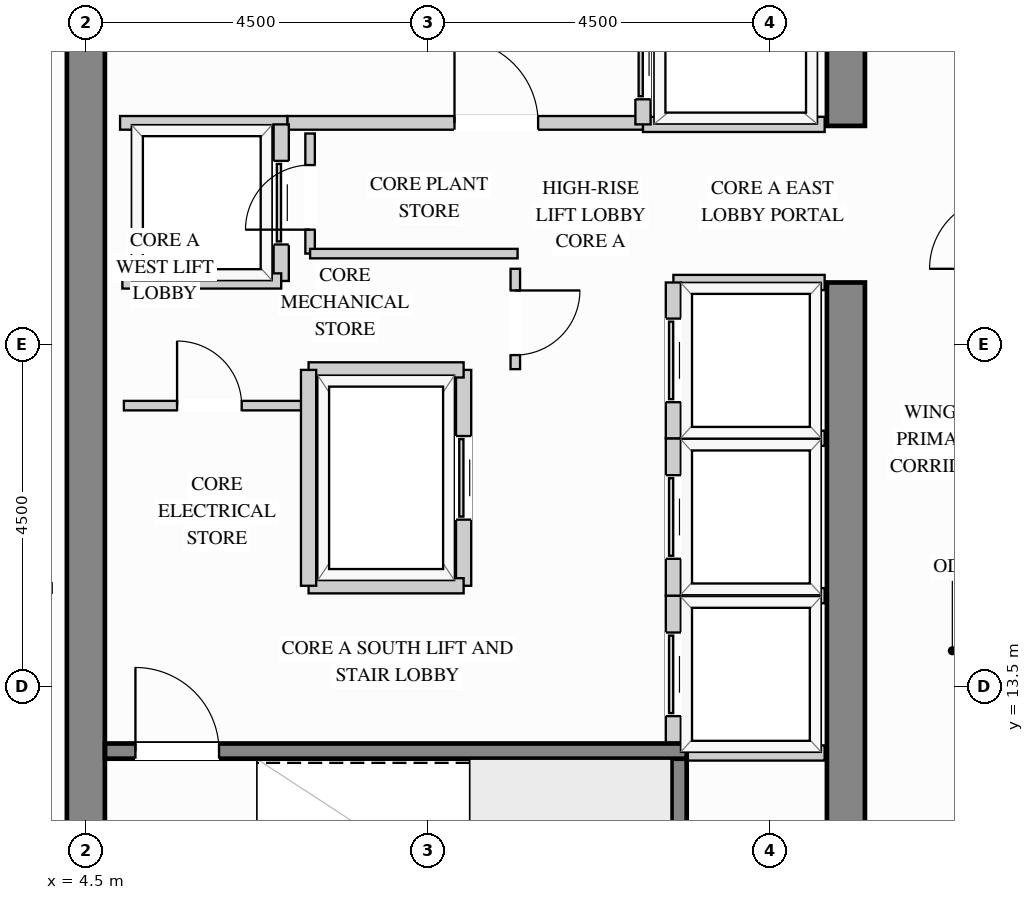
"""IFC4 building model, lengths in metres.
Left out: names, types, materials, properties, quantities, classifications, styles, units other than length and angle.
Written with IfcOpenShell. Run it as: python <this file> out.ifc"""

import sys

from ifc_helpers import new_model, si_unit, direction, frame, frame_2d, origin, place, context, subcontext, project, spatial, rectangle, extrude, source, transform, mapped, element, fill, save


model = new_model("IFC4")
c1 = context("Model", 3, precision=1e-05, world=origin(), true_north=direction((0.0, 1.0)))
c2 = subcontext(c1, "Body", "Model", "MODEL_VIEW")
j1 = project(units=[si_unit("LENGTHUNIT", "METRE"), si_unit("PLANEANGLEUNIT", "RADIAN")], contexts=[c1])
p1 = place(None, origin())
s1 = spatial("IfcSite", under=j1, at=p1, CompositionType="ELEMENT")
p2 = place(p1, origin())
s2 = spatial("IfcBuilding", under=s1, at=p2, CompositionType="ELEMENT")
p3 = place(p2, frame((0.0, 0.0, 219.6)))
s3 = spatial("IfcBuildingStorey", under=s2, at=p3, CompositionType="ELEMENT", Elevation=219.6)
m1 = source(origin(), c2, "Body", "SweptSolid", [
    extrude(rectangle(XDim=10.07, YDim=0.5, at=frame_2d((5.035, 0.0))), origin(), (0.0, 0.0, 1.0), 3.4),
])
p4 = place(p3, frame((14.5, 8.75, 0.0), z_axis=(0.0, 0.0, 1.0), x_axis=(0.0, 1.0, 0.0)))
e1 = element("IfcWall", 1, at=p4, inside=s3, PredefinedType="SHEAR", context=c2, shape_type="MappedRepresentation", body=[
    mapped(m1, transform((0.0, 0.0, 0.0), x_axis=(1.0, 0.0, 0.0), y_axis=(0.0, 1.0, 0.0), z_axis=(0.0, 0.0, 1.0))),
])
m2 = source(origin(), c2, "Body", "SweptSolid", [
    extrude(rectangle(XDim=8.37, YDim=0.5, at=frame_2d((4.185, 0.0))), origin(), (0.0, 0.0, 1.0), 3.4),
])
p5 = place(p3, frame((14.5, 20.88, 0.0), z_axis=(0.0, 0.0, 1.0), x_axis=(0.0, 1.0, 0.0)))
e2 = element("IfcWall", 2, at=p5, inside=s3, PredefinedType="SHEAR", context=c2, shape_type="MappedRepresentation", body=[
    mapped(m2, transform((0.0, 0.0, 0.0), x_axis=(1.0, 0.0, 0.0), y_axis=(0.0, 1.0, 0.0), z_axis=(0.0, 0.0, 1.0))),
])
m3 = source(origin(), c2, "Body", "SweptSolid", [
    extrude(rectangle(XDim=20.5, YDim=0.5, at=frame_2d((10.25, 0.0))), origin(), (0.0, 0.0, 1.0), 3.4),
])
p6 = place(p3, frame((4.5, 8.75, 0.0), z_axis=(0.0, 0.0, 1.0), x_axis=(0.0, 1.0, 0.0)))
e3 = element("IfcWall", 3, at=p6, inside=s3, PredefinedType="SHEAR", context=c2, shape_type="MappedRepresentation", body=[
    mapped(m3, transform((0.0, 0.0, 0.0), x_axis=(1.0, 0.0, 0.0), y_axis=(0.0, 1.0, 0.0), z_axis=(0.0, 0.0, 1.0))),
])
p7 = place(p3, frame((7.15, 20.92, 0.0), z_axis=(0.0, 0.0, 1.0), x_axis=(1.0, 0.0, 0.0)))
e4 = element("IfcWall", 4, at=p7, inside=s3, PredefinedType="PARTITIONING", context=c2, shape_type="SweptSolid", body=[
    extrude(rectangle(XDim=4.68, YDim=0.18, at=frame_2d((2.34, 0.0))), origin(), (0.0, 0.0, 1.0), 3.385),
])
p8 = place(p7, frame((2.2, 0.0, 0.0)))
e5 = element("IfcOpeningElement", 5, at=p8, cuts=e4, PredefinedType="OPENING", context=c2, shape_type="SweptSolid", body=[
    extrude(rectangle(XDim=1.1, YDim=2.15, at=frame_2d((0.55, 1.075))), frame((0.0, 0.1, 0.0), z_axis=(0.0, -1.0, 0.0), x_axis=(1.0, 0.0, 0.0)), (0.0, 0.0, 1.0), 0.2),
])
m4 = source(origin(), c2, "Body", "SweptSolid", [
    extrude(rectangle(XDim=2.2, YDim=0.18, at=frame_2d((1.1, 0.0))), origin(), (0.0, 0.0, 1.0), 3.385),
])
p9 = place(p3, frame((4.95, 20.92, 0.0), z_axis=(0.0, 0.0, 1.0), x_axis=(1.0, 0.0, 0.0)))
e6 = element("IfcWall", 6, at=p9, inside=s3, PredefinedType="PARTITIONING", context=c2, shape_type="MappedRepresentation", body=[
    mapped(m4, transform((0.0, 0.0, 0.0), x_axis=(1.0, 0.0, 0.0), y_axis=(0.0, 1.0, 0.0), z_axis=(0.0, 0.0, 1.0))),
])
p10 = place(p3, frame((10.15, 17.68, 0.0), z_axis=(0.0, 0.0, 1.0), x_axis=(0.0, 1.0, 0.0)))
e7 = element("IfcWall", 7, at=p10, inside=s3, PredefinedType="PARTITIONING", context=c2, shape_type="SweptSolid", body=[
    extrude(rectangle(XDim=1.32, YDim=0.125, at=frame_2d((0.66, 0.0))), origin(), (0.0, 0.0, 1.0), 3.385),
])
p11 = place(p10, frame((0.185, 0.0, 0.0)))
e8 = element("IfcOpeningElement", 8, at=p11, cuts=e7, PredefinedType="OPENING", context=c2, shape_type="SweptSolid", body=[
    extrude(rectangle(XDim=0.85, YDim=2.1, at=frame_2d((0.425, 1.05))), frame((0.0, 0.073, 0.0), z_axis=(0.0, -1.0, 0.0), x_axis=(1.0, 0.0, 0.0)), (0.0, 0.0, 1.0), 0.145),
])
p12 = place(p3, frame((7.45, 19.2, 0.0), z_axis=(0.0, 0.0, 1.0), x_axis=(0.0, 1.0, 0.0)))
e9 = element("IfcWall", 9, at=p12, inside=s3, PredefinedType="PARTITIONING", context=c2, shape_type="SweptSolid", body=[
    extrude(rectangle(XDim=1.58, YDim=0.125, at=frame_2d((0.79, 0.0))), origin(), (0.0, 0.0, 1.0), 3.385),
])
p13 = place(p12, frame((0.315, 0.0, 0.0)))
e10 = element("IfcOpeningElement", 10, at=p13, cuts=e9, PredefinedType="OPENING", context=c2, shape_type="SweptSolid", body=[
    extrude(rectangle(XDim=0.85, YDim=2.1, at=frame_2d((0.425, 1.05))), frame((0.0, 0.073, 0.0), z_axis=(0.0, -1.0, 0.0), x_axis=(1.0, 0.0, 0.0)), (0.0, 0.0, 1.0), 0.145),
])
m5 = source(origin(), c2, "Body", "SweptSolid", [
    extrude(rectangle(XDim=2.73, YDim=0.125, at=frame_2d((1.365, 0.0))), origin(), (0.0, 0.0, 1.0), 3.385),
])
p14 = place(p3, frame((7.45, 19.2, 0.0), z_axis=(0.0, 0.0, 1.0), x_axis=(1.0, 0.0, 0.0)))
e11 = element("IfcWall", 11, at=p14, inside=s3, PredefinedType="PARTITIONING", context=c2, shape_type="MappedRepresentation", body=[
    mapped(m5, transform((0.0, 0.0, 0.0), x_axis=(1.0, 0.0, 0.0), y_axis=(0.0, 1.0, 0.0), z_axis=(0.0, 0.0, 1.0))),
])
p15 = place(p3, frame((5.0, 17.2, 0.0), z_axis=(0.0, 0.0, 1.0), x_axis=(1.0, 0.0, 0.0)))
e12 = element("IfcWall", 12, at=p15, inside=s3, PredefinedType="PARTITIONING", context=c2, shape_type="SweptSolid", body=[
    extrude(rectangle(XDim=2.4, YDim=0.125, at=frame_2d((1.2, 0.0))), origin(), (0.0, 0.0, 1.0), 3.385),
])
p16 = place(p15, frame((0.7, 0.0, 0.0)))
e13 = element("IfcOpeningElement", 13, at=p16, cuts=e12, PredefinedType="OPENING", context=c2, shape_type="SweptSolid", body=[
    extrude(rectangle(XDim=0.85, YDim=2.1, at=frame_2d((0.425, 1.05))), frame((0.0, 0.073, 0.0), z_axis=(0.0, -1.0, 0.0), x_axis=(1.0, 0.0, 0.0)), (0.0, 0.0, 1.0), 0.145),
])
m6 = source(origin(), c2, "Body", "SweptSolid", [
    extrude(rectangle(XDim=3.698, YDim=0.125, at=frame_2d((1.849, 0.0))), origin(), (0.0, 0.0, 1.0), 3.385),
])
p17 = place(p3, frame((0.352, 14.8, 0.0), z_axis=(0.0, 0.0, 1.0), x_axis=(1.0, 0.0, 0.0)))
e14 = element("IfcWall", 14, at=p17, inside=s3, PredefinedType="PARTITIONING", context=c2, shape_type="MappedRepresentation", body=[
    mapped(m6, transform((0.0, 0.0, 0.0), x_axis=(1.0, 0.0, 0.0), y_axis=(0.0, 1.0, 0.0), z_axis=(0.0, 0.0, 1.0))),
])
m7 = source(origin(), c2, "Body", "SweptSolid", [
    extrude(rectangle(XDim=2.39, YDim=0.2, at=frame_2d((1.195, 0.0))), origin(), (0.0, 0.0, 1.0), 3.385),
])
p18 = place(p3, frame((11.83, 20.9, 0.0), z_axis=(0.0, 0.0, 1.0), x_axis=(1.0, 0.0, 0.0)))
e15 = element("IfcWall", 15, at=p18, inside=s3, PredefinedType="PARTITIONING", context=c2, shape_type="MappedRepresentation", body=[
    mapped(m7, transform((0.0, 0.0, 0.0), x_axis=(1.0, 0.0, 0.0), y_axis=(0.0, 1.0, 0.0), z_axis=(0.0, 0.0, 1.0))),
])
p19 = place(p3, frame((11.83, 20.9, 0.0), z_axis=(0.0, 0.0, 1.0), x_axis=(0.0, 1.0, 0.0)))
e16 = element("IfcWall", 16, at=p19, inside=s3, PredefinedType="PARTITIONING", context=c2, shape_type="SweptSolid", body=[
    extrude(rectangle(XDim=1.76, YDim=0.2, at=frame_2d((0.88, 0.0))), origin(), (0.0, 0.0, 1.0), 3.385),
])
p20 = place(p19, frame((0.33, 0.0, 0.0)))
e17 = element("IfcOpeningElement", 17, at=p20, cuts=e16, PredefinedType="OPENING", context=c2, shape_type="SweptSolid", body=[
    extrude(rectangle(XDim=1.1, YDim=2.2, at=frame_2d((0.55, 1.1))), frame((0.0, 0.11, 0.0), z_axis=(0.0, -1.0, 0.0), x_axis=(1.0, 0.0, 0.0)), (0.0, 0.0, 1.0), 0.22),
])
m8 = source(origin(), c2, "Body", "SweptSolid", [
    extrude(rectangle(XDim=1.99, YDim=0.2, at=frame_2d((0.995, 0.0))), origin(), (0.0, 0.0, 1.0), 3.385),
])
for number, where, z_axis, x_axis in (
    (18, (12.23, 14.7, 0.0), (0.0, 0.0, 1.0), (1.0, 0.0, 0.0)),
    (19, (12.23, 12.63, 0.0), (0.0, 0.0, 1.0), (1.0, 0.0, 0.0)),
):
    element("IfcWall", number, at=place(p3, frame(where, z_axis=z_axis, x_axis=x_axis)), inside=s3, PredefinedType="PARTITIONING", context=c2, shape_type="MappedRepresentation", body=[
        mapped(m8, transform((0.0, 0.0, 0.0), x_axis=(1.0, 0.0, 0.0), y_axis=(0.0, 1.0, 0.0), z_axis=(0.0, 0.0, 1.0))),
    ])
p21 = place(p3, frame((12.23, 12.63, 0.0), z_axis=(0.0, 0.0, 1.0), x_axis=(0.0, 1.0, 0.0)))
e20 = element("IfcWall", 20, at=p21, inside=s3, PredefinedType="PARTITIONING", context=c2, shape_type="SweptSolid", body=[
    extrude(rectangle(XDim=2.07, YDim=0.2, at=frame_2d((1.035, 0.0))), origin(), (0.0, 0.0, 1.0), 3.385),
])
p22 = place(p21, frame((0.485, 0.0, 0.0)))
e21 = element("IfcOpeningElement", 21, at=p22, cuts=e20, PredefinedType="OPENING", context=c2, shape_type="SweptSolid", body=[
    extrude(rectangle(XDim=1.1, YDim=2.2, at=frame_2d((0.55, 1.1))), frame((0.0, 0.11, 0.0), z_axis=(0.0, -1.0, 0.0), x_axis=(1.0, 0.0, 0.0)), (0.0, 0.0, 1.0), 0.22),
])
p23 = place(p3, frame((12.23, 16.77, 0.0), z_axis=(0.0, 0.0, 1.0), x_axis=(1.0, 0.0, 0.0)))
e22 = element("IfcWall", 22, at=p23, inside=s3, PredefinedType="PARTITIONING", context=c2, shape_type="MappedRepresentation", body=[
    mapped(m8, transform((0.0, 0.0, 0.0), x_axis=(1.0, 0.0, 0.0), y_axis=(0.0, 1.0, 0.0), z_axis=(0.0, 0.0, 1.0))),
])
p24 = place(p3, frame((12.23, 14.7, 0.0), z_axis=(0.0, 0.0, 1.0), x_axis=(0.0, 1.0, 0.0)))
e23 = element("IfcWall", 23, at=p24, inside=s3, PredefinedType="PARTITIONING", context=c2, shape_type="SweptSolid", body=[
    extrude(rectangle(XDim=2.07, YDim=0.2, at=frame_2d((1.035, 0.0))), origin(), (0.0, 0.0, 1.0), 3.385),
])
p25 = place(p24, frame((0.485, 0.0, 0.0)))
e24 = element("IfcOpeningElement", 24, at=p25, cuts=e23, PredefinedType="OPENING", context=c2, shape_type="SweptSolid", body=[
    extrude(rectangle(XDim=1.1, YDim=2.2, at=frame_2d((0.55, 1.1))), frame((0.0, 0.11, 0.0), z_axis=(0.0, -1.0, 0.0), x_axis=(1.0, 0.0, 0.0)), (0.0, 0.0, 1.0), 0.22),
])
p26 = place(p3, frame((12.23, 18.82, 0.0), z_axis=(0.0, 0.0, 1.0), x_axis=(1.0, 0.0, 0.0)))
e25 = element("IfcWall", 25, at=p26, inside=s3, PredefinedType="PARTITIONING", context=c2, shape_type="MappedRepresentation", body=[
    mapped(m8, transform((0.0, 0.0, 0.0), x_axis=(1.0, 0.0, 0.0), y_axis=(0.0, 1.0, 0.0), z_axis=(0.0, 0.0, 1.0))),
])
p27 = place(p3, frame((12.23, 16.77, 0.0), z_axis=(0.0, 0.0, 1.0), x_axis=(0.0, 1.0, 0.0)))
e26 = element("IfcWall", 26, at=p27, inside=s3, PredefinedType="PARTITIONING", context=c2, shape_type="SweptSolid", body=[
    extrude(rectangle(XDim=2.05, YDim=0.2, at=frame_2d((1.025, 0.0))), origin(), (0.0, 0.0, 1.0), 3.385),
])
p28 = place(p27, frame((0.475, 0.0, 0.0)))
e27 = element("IfcOpeningElement", 27, at=p28, cuts=e26, PredefinedType="OPENING", context=c2, shape_type="SweptSolid", body=[
    extrude(rectangle(XDim=1.1, YDim=2.2, at=frame_2d((0.55, 1.1))), frame((0.0, 0.11, 0.0), z_axis=(0.0, -1.0, 0.0), x_axis=(1.0, 0.0, 0.0)), (0.0, 0.0, 1.0), 0.22),
])
p29 = place(p3, frame((7.07, 18.84, 0.0), z_axis=(0.0, 0.0, 1.0), x_axis=(0.0, 1.0, 0.0)))
e28 = element("IfcWall", 28, at=p29, inside=s3, PredefinedType="PARTITIONING", context=c2, shape_type="SweptSolid", body=[
    extrude(rectangle(XDim=2.06, YDim=0.2, at=frame_2d((1.03, 0.0))), origin(), (0.0, 0.0, 1.0), 3.385),
])
p30 = place(p29, frame((0.48, 0.0, 0.0)))
e29 = element("IfcOpeningElement", 29, at=p30, cuts=e28, PredefinedType="OPENING", context=c2, shape_type="SweptSolid", body=[
    extrude(rectangle(XDim=1.1, YDim=2.2, at=frame_2d((0.55, 1.1))), frame((0.0, 0.11, 0.0), z_axis=(0.0, -1.0, 0.0), x_axis=(1.0, 0.0, 0.0)), (0.0, 0.0, 1.0), 0.22),
])
m9 = source(origin(), c2, "Body", "SweptSolid", [
    extrude(rectangle(XDim=2.09, YDim=0.2, at=frame_2d((1.045, 0.0))), origin(), (0.0, 0.0, 1.0), 3.385),
])
p31 = place(p3, frame((4.98, 18.84, 0.0), z_axis=(0.0, 0.0, 1.0), x_axis=(1.0, 0.0, 0.0)))
e30 = element("IfcWall", 30, at=p31, inside=s3, PredefinedType="PARTITIONING", context=c2, shape_type="MappedRepresentation", body=[
    mapped(m9, transform((0.0, 0.0, 0.0), x_axis=(1.0, 0.0, 0.0), y_axis=(0.0, 1.0, 0.0), z_axis=(0.0, 0.0, 1.0))),
])
p32 = place(p3, frame((9.47, 14.83, 0.0), z_axis=(0.0, 0.0, 1.0), x_axis=(0.0, 1.0, 0.0)))
e31 = element("IfcWall", 31, at=p32, inside=s3, PredefinedType="PARTITIONING", context=c2, shape_type="SweptSolid", body=[
    extrude(rectangle(XDim=2.84, YDim=0.2, at=frame_2d((1.42, 0.0))), origin(), (0.0, 0.0, 1.0), 3.385),
])
p33 = place(p32, frame((0.87, 0.0, 0.0)))
e32 = element("IfcOpeningElement", 32, at=p33, cuts=e31, PredefinedType="OPENING", context=c2, shape_type="SweptSolid", body=[
    extrude(rectangle(XDim=1.1, YDim=2.2, at=frame_2d((0.55, 1.1))), frame((0.0, 0.11, 0.0), z_axis=(0.0, -1.0, 0.0), x_axis=(1.0, 0.0, 0.0)), (0.0, 0.0, 1.0), 0.22),
])
m10 = source(origin(), c2, "Body", "SweptSolid", [
    extrude(rectangle(XDim=2.04, YDim=0.2, at=frame_2d((1.02, 0.0))), origin(), (0.0, 0.0, 1.0), 3.385),
])
for number, where, z_axis, x_axis in (
    (33, (7.43, 17.67, 0.0), (0.0, 0.0, 1.0), (1.0, 0.0, 0.0)),
    (34, (7.43, 14.83, 0.0), (0.0, 0.0, 1.0), (1.0, 0.0, 0.0)),
):
    element("IfcWall", number, at=place(p3, frame(where, z_axis=z_axis, x_axis=x_axis)), inside=s3, PredefinedType="PARTITIONING", context=c2, shape_type="MappedRepresentation", body=[
        mapped(m10, transform((0.0, 0.0, 0.0), x_axis=(1.0, 0.0, 0.0), y_axis=(0.0, 1.0, 0.0), z_axis=(0.0, 0.0, 1.0))),
    ])
m11 = source(origin(), c2, "Body", "SweptSolid", [
    extrude(rectangle(XDim=2.84, YDim=0.2, at=frame_2d((1.42, 0.0))), origin(), (0.0, 0.0, 1.0), 3.385),
])
p34 = place(p3, frame((7.43, 14.83, 0.0), z_axis=(0.0, 0.0, 1.0), x_axis=(0.0, 1.0, 0.0)))
e35 = element("IfcWall", 35, at=p34, inside=s3, PredefinedType="PARTITIONING", context=c2, shape_type="MappedRepresentation", body=[
    mapped(m11, transform((0.0, 0.0, 0.0), x_axis=(1.0, 0.0, 0.0), y_axis=(0.0, 1.0, 0.0), z_axis=(0.0, 0.0, 1.0))),
])
m12 = source(origin(), c2, "Body", "SweptSolid", [
    extrude(rectangle(XDim=3.803, YDim=0.2, at=frame_2d((1.901, 0.0))), origin(), (0.0, 0.0, 1.0), 3.4),
])
p35 = place(p3, frame((12.305, 8.752, 0.0), z_axis=(0.0, 0.0, 1.0), x_axis=(0.0, 1.0, 0.0)))
e36 = element("IfcWall", 36, at=p35, inside=s3, PredefinedType="SHEAR", context=c2, shape_type="MappedRepresentation", body=[
    mapped(m12, transform((0.0, 0.0, 0.0), x_axis=(1.0, 0.0, 0.0), y_axis=(0.0, 1.0, 0.0), z_axis=(0.0, 0.0, 1.0))),
])
p36 = place(p3, frame((4.752, 12.655, 0.0), z_axis=(0.0, 0.0, 1.0), x_axis=(1.0, 0.0, 0.0)))
e37 = element("IfcWall", 37, at=p36, inside=s3, PredefinedType="SHEAR", context=c2, shape_type="SweptSolid", body=[
    extrude(rectangle(XDim=7.653, YDim=0.2, at=frame_2d((3.827, 0.0))), origin(), (0.0, 0.0, 1.0), 3.4),
])
p37 = place(p36, frame((0.4, 0.0, 0.0)))
e38 = element("IfcOpeningElement", 38, at=p37, cuts=e37, PredefinedType="OPENING", context=c2, shape_type="SweptSolid", body=[
    extrude(rectangle(XDim=1.1, YDim=2.15, at=frame_2d((0.55, 1.075))), frame((0.0, 0.11, 0.0), z_axis=(0.0, -1.0, 0.0), x_axis=(1.0, 0.0, 0.0)), (0.0, 0.0, 1.0), 0.22),
])
m13 = source(origin(), c2, "Body", "SweptSolid", [
    extrude(rectangle(XDim=1.1, YDim=2.15, at=frame_2d((0.55, 1.075))), frame((0.0, 0.025, 0.0), z_axis=(0.0, -1.0, 0.0), x_axis=(1.0, 0.0, 0.0)), (0.0, 0.0, 1.0), 0.05),
])
p38 = place(p8, origin())
e39 = element("IfcDoor", 39, at=p38, inside=s3, OperationType="SINGLE_SWING_LEFT", PredefinedType="DOOR", context=c2, shape_type="MappedRepresentation", body=[
    mapped(m13, transform((0.0, 0.0, 0.0), x_axis=(1.0, 0.0, 0.0), y_axis=(0.0, 1.0, 0.0), z_axis=(0.0, 0.0, 1.0))),
])
fill(e5, e39)
m14 = source(origin(), c2, "Body", "SweptSolid", [
    extrude(rectangle(XDim=1.1, YDim=2.2, at=frame_2d((0.55, 1.1))), frame((0.0, 0.025, 0.0), z_axis=(0.0, -1.0, 0.0), x_axis=(1.0, 0.0, 0.0)), (0.0, 0.0, 1.0), 0.05),
])
p39 = place(p20, origin())
e40 = element("IfcDoor", 40, at=p39, inside=s3, OperationType="SLIDING_TO_LEFT", PredefinedType="DOOR", context=c2, shape_type="MappedRepresentation", body=[
    mapped(m14, transform((0.0, 0.0, 0.0), x_axis=(1.0, 0.0, 0.0), y_axis=(0.0, 1.0, 0.0), z_axis=(0.0, 0.0, 1.0))),
])
fill(e17, e40)
p40 = place(p22, origin())
e41 = element("IfcDoor", 41, at=p40, inside=s3, OperationType="SLIDING_TO_LEFT", PredefinedType="DOOR", context=c2, shape_type="MappedRepresentation", body=[
    mapped(m14, transform((0.0, 0.0, 0.0), x_axis=(1.0, 0.0, 0.0), y_axis=(0.0, 1.0, 0.0), z_axis=(0.0, 0.0, 1.0))),
])
fill(e21, e41)
p41 = place(p25, origin())
e42 = element("IfcDoor", 42, at=p41, inside=s3, OperationType="SLIDING_TO_LEFT", PredefinedType="DOOR", context=c2, shape_type="MappedRepresentation", body=[
    mapped(m14, transform((0.0, 0.0, 0.0), x_axis=(1.0, 0.0, 0.0), y_axis=(0.0, 1.0, 0.0), z_axis=(0.0, 0.0, 1.0))),
])
fill(e24, e42)
p42 = place(p28, origin())
e43 = element("IfcDoor", 43, at=p42, inside=s3, OperationType="SLIDING_TO_LEFT", PredefinedType="DOOR", context=c2, shape_type="MappedRepresentation", body=[
    mapped(m14, transform((0.0, 0.0, 0.0), x_axis=(1.0, 0.0, 0.0), y_axis=(0.0, 1.0, 0.0), z_axis=(0.0, 0.0, 1.0))),
])
fill(e27, e43)
p43 = place(p30, origin())
e44 = element("IfcDoor", 44, at=p43, inside=s3, OperationType="SLIDING_TO_LEFT", PredefinedType="DOOR", context=c2, shape_type="MappedRepresentation", body=[
    mapped(m14, transform((0.0, 0.0, 0.0), x_axis=(1.0, 0.0, 0.0), y_axis=(0.0, 1.0, 0.0), z_axis=(0.0, 0.0, 1.0))),
])
fill(e29, e44)
p44 = place(p33, origin())
e45 = element("IfcDoor", 45, at=p44, inside=s3, OperationType="SLIDING_TO_LEFT", PredefinedType="DOOR", context=c2, shape_type="MappedRepresentation", body=[
    mapped(m14, transform((0.0, 0.0, 0.0), x_axis=(1.0, 0.0, 0.0), y_axis=(0.0, 1.0, 0.0), z_axis=(0.0, 0.0, 1.0))),
])
fill(e32, e45)
m15 = source(origin(), c2, "Body", "SweptSolid", [
    extrude(rectangle(XDim=0.85, YDim=2.1, at=frame_2d((0.425, 1.05))), frame((0.0, 0.025, 0.0), z_axis=(0.0, -1.0, 0.0), x_axis=(1.0, 0.0, 0.0)), (0.0, 0.0, 1.0), 0.05),
])
p45 = place(p11, origin())
e46 = element("IfcDoor", 46, at=p45, inside=s3, OperationType="SINGLE_SWING_RIGHT", PredefinedType="DOOR", context=c2, shape_type="MappedRepresentation", body=[
    mapped(m15, transform((0.0, 0.0, 0.0), x_axis=(1.0, 0.0, 0.0), y_axis=(0.0, 1.0, 0.0), z_axis=(0.0, 0.0, 1.0))),
])
fill(e8, e46)
p46 = place(p16, origin())
e47 = element("IfcDoor", 47, at=p46, inside=s3, OperationType="SINGLE_SWING_LEFT", PredefinedType="DOOR", context=c2, shape_type="MappedRepresentation", body=[
    mapped(m15, transform((0.0, 0.0, 0.0), x_axis=(1.0, 0.0, 0.0), y_axis=(0.0, 1.0, 0.0), z_axis=(0.0, 0.0, 1.0))),
])
fill(e13, e47)
p47 = place(p13, origin())
e48 = element("IfcDoor", 48, at=p47, inside=s3, OperationType="SINGLE_SWING_LEFT", PredefinedType="DOOR", context=c2, shape_type="MappedRepresentation", body=[
    mapped(m15, transform((0.0, 0.0, 0.0), x_axis=(1.0, 0.0, 0.0), y_axis=(0.0, 1.0, 0.0), z_axis=(0.0, 0.0, 1.0))),
])
fill(e10, e48)
m16 = source(origin(), c2, "Body", "SweptSolid", [
    extrude(rectangle(XDim=1.1, YDim=2.15, at=frame_2d((0.55, 1.075))), frame((0.0, 0.025, 0.0), z_axis=(0.0, -1.0, 0.0), x_axis=(1.0, 0.0, 0.0)), (0.0, 0.0, 1.0), 0.05),
])
p48 = place(p37, origin())
e49 = element("IfcDoor", 49, at=p48, inside=s3, OperationType="SINGLE_SWING_LEFT", PredefinedType="DOOR", context=c2, shape_type="MappedRepresentation", body=[
    mapped(m16, transform((0.0, 0.0, 0.0), x_axis=(1.0, 0.0, 0.0), y_axis=(0.0, 1.0, 0.0), z_axis=(0.0, 0.0, 1.0))),
])
fill(e38, e49)
save(model, sys.argv[1])
